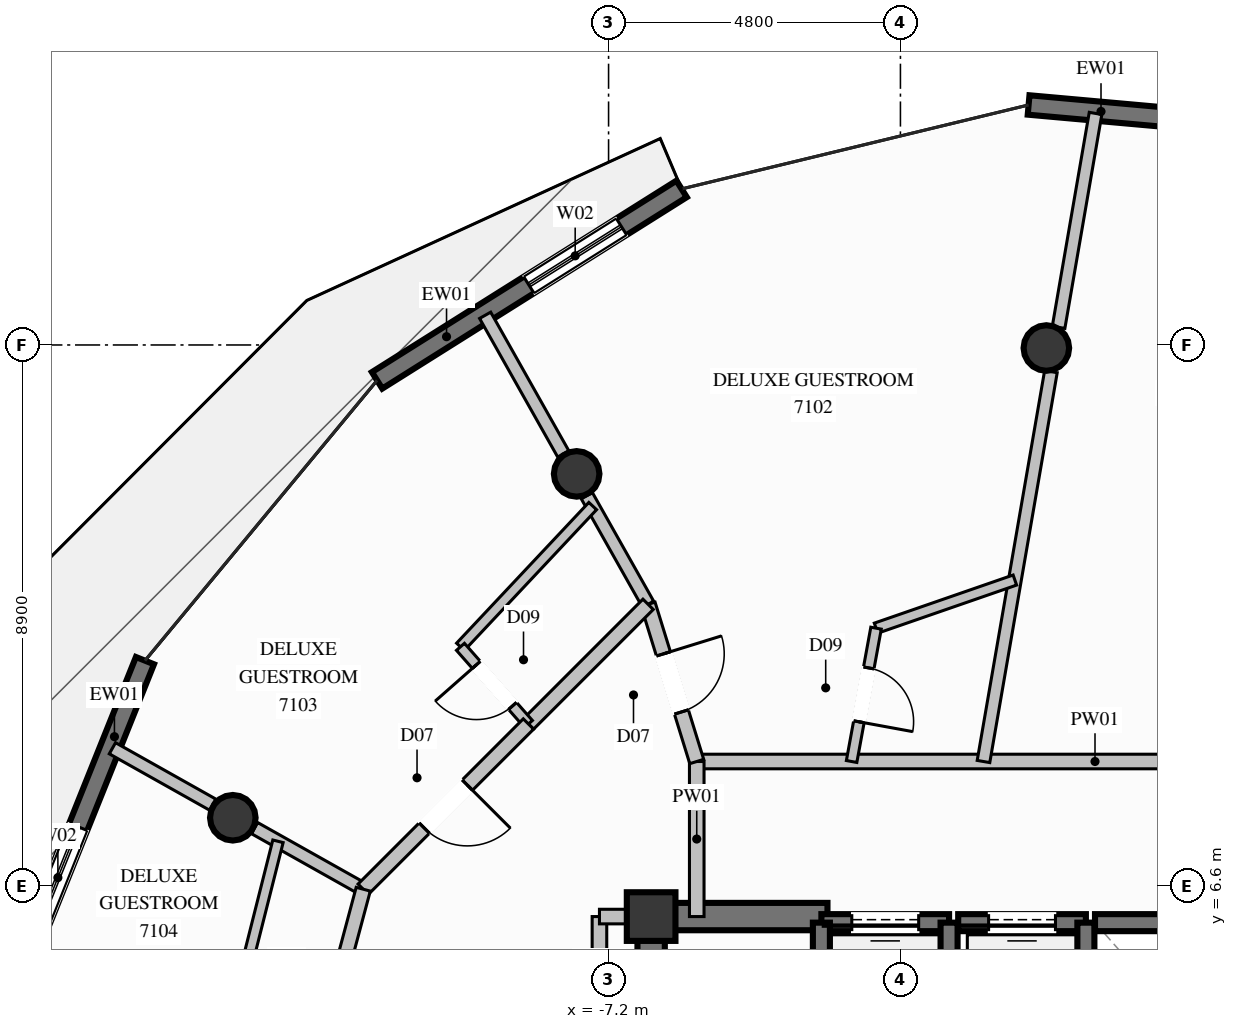
"""IFC4 building model, lengths in metres.
Left out: names, types, materials, properties, quantities, classifications, styles, units other than length and angle.
Written with IfcOpenShell. Run it as: python <this file> out.ifc"""

import sys

from ifc_helpers import new_model, si_unit, direction, frame, frame_2d, origin, origin_2d, place, context, subcontext, project, spatial, rectangle, circle, extrude, element, fill, save


model = new_model("IFC4")
c1 = context("Model", 3, precision=1e-05, world=origin(), true_north=direction((0.0, 1.0)))
c2 = subcontext(c1, "Body", "Model", "MODEL_VIEW")
j1 = project(units=[si_unit("LENGTHUNIT", "METRE"), si_unit("PLANEANGLEUNIT", "RADIAN")], contexts=[c1])
p1 = place(None, origin())
s1 = spatial("IfcSite", under=j1, at=p1, CompositionType="ELEMENT")
p2 = place(p1, origin())
s2 = spatial("IfcBuilding", under=s1, at=p2, CompositionType="ELEMENT")
p3 = place(p2, frame((0.0, 0.0, 266.8)))
s3 = spatial("IfcBuildingStorey", under=s2, at=p3, CompositionType="ELEMENT", Elevation=266.8)
p4 = place(p3, frame((-6.5, 6.1, 0.0), z_axis=(0.0, 0.0, 1.0), x_axis=(1.0, 0.0, 0.0)))
e1 = element("IfcColumn", 1, at=p4, inside=s3, PredefinedType="COLUMN", context=c2, shape_type="SweptSolid", body=[
    extrude(rectangle(XDim=0.8, YDim=0.8, at=origin_2d()), origin(), (0.0, 0.0, 1.0), 3.8),
])
p5 = place(p3, frame((-6.275, 6.1, 0.0), z_axis=(0.0, 0.0, 1.0), x_axis=(1.0, 0.0, 0.0)))
e2 = element("IfcWall", 2, at=p5, inside=s3, PredefinedType="SHEAR", context=c2, shape_type="SweptSolid", body=[
    extrude(rectangle(XDim=2.675, YDim=0.45, at=frame_2d((1.337, 0.0))), origin(), (0.0, 0.0, 1.0), 3.8),
])
p6 = place(p3, frame((-6.5, 2.35, 0.0), z_axis=(0.0, 0.0, 1.0), x_axis=(0.0, 1.0, 0.0)))
e3 = element("IfcWall", 3, at=p6, inside=s3, PredefinedType="SHEAR", context=c2, shape_type="SweptSolid", body=[
    extrude(rectangle(XDim=3.975, YDim=0.45, at=frame_2d((1.987, 0.0))), origin(), (0.0, 0.0, 1.0), 3.8),
])
for number, where, z_axis, x_axis in (
    (4, (0.0, 15.45, 0.0), (0.0, 0.0, 1.0), (1.0, 0.0, 0.0)),
    (5, (-7.725, 13.38, 0.0), (0.0, 0.0, 1.0), (1.0, 0.0, 0.0)),
    (6, (-13.38, 7.725, 0.0), (0.0, 0.0, 1.0), (1.0, 0.0, 0.0)),
):
    element("IfcColumn", number, at=place(p3, frame(where, z_axis=z_axis, x_axis=x_axis)), inside=s3, PredefinedType="COLUMN", context=c2, shape_type="SweptSolid", body=[
        extrude(circle(Radius=0.375, at=origin_2d()), origin(), (0.0, 0.0, 1.0), 3.8),
    ])
p7 = place(p3, frame((-0.292, 19.447, 0.0), z_axis=(0.0, 0.0, 1.0), x_axis=(0.996011950585, -0.08921992094, 0.0)))
e7 = element("IfcWall", 7, at=p7, inside=s3, PredefinedType="SOLIDWALL", context=c2, shape_type="SweptSolid", body=[
    extrude(rectangle(XDim=5.872, YDim=0.32, at=frame_2d((2.936, 0.0))), origin(), (0.0, 0.0, 1.0), 3.57),
])
p8 = place(p7, frame((2.641, 0.0, 0.35)))
e8 = element("IfcOpeningElement", 8, at=p8, cuts=e7, PredefinedType="OPENING", context=c2, shape_type="SweptSolid", body=[
    extrude(rectangle(XDim=1.8, YDim=2.6, at=frame_2d((0.9, 1.3))), frame((0.0, 0.17, 0.0), z_axis=(0.0, -1.0, 0.0), x_axis=(1.0, 0.0, 0.0)), (0.0, 0.0, 1.0), 0.34),
])
p9 = place(p3, frame((-11.007, 14.918, 0.0), z_axis=(0.0, 0.0, 1.0), x_axis=(0.846634423967, 0.532174926273, 0.0)))
e9 = element("IfcWall", 9, at=p9, inside=s3, PredefinedType="SOLIDWALL", context=c2, shape_type="SweptSolid", body=[
    extrude(rectangle(XDim=5.915, YDim=0.32, at=frame_2d((2.958, 0.0))), origin(), (0.0, 0.0, 1.0), 3.57),
])
p10 = place(p9, frame((2.948, 0.0, 0.35)))
e10 = element("IfcOpeningElement", 10, at=p10, cuts=e9, PredefinedType="OPENING", context=c2, shape_type="SweptSolid", body=[
    extrude(rectangle(XDim=1.8, YDim=2.6, at=frame_2d((0.9, 1.3))), frame((0.0, 0.17, 0.0), z_axis=(0.0, -1.0, 0.0), x_axis=(1.0, 0.0, 0.0)), (0.0, 0.0, 1.0), 0.34),
])
p11 = place(p3, frame((-17.079, 4.691, 0.0), z_axis=(0.0, 0.0, 1.0), x_axis=(0.372370916096, 0.928083994499, 0.0)))
e11 = element("IfcWall", 11, at=p11, inside=s3, PredefinedType="SOLIDWALL", context=c2, shape_type="SweptSolid", body=[
    extrude(rectangle(XDim=6.053, YDim=0.32, at=frame_2d((3.027, 0.0))), origin(), (0.0, 0.0, 1.0), 3.57),
])
p12 = place(p11, frame((1.308, 0.0, 0.35)))
e12 = element("IfcOpeningElement", 12, at=p12, cuts=e11, PredefinedType="OPENING", context=c2, shape_type="SweptSolid", body=[
    extrude(rectangle(XDim=1.8, YDim=2.6, at=frame_2d((0.9, 1.3))), frame((0.0, 0.17, 0.0), z_axis=(0.0, -1.0, 0.0), x_axis=(1.0, 0.0, 0.0)), (0.0, 0.0, 1.0), 0.34),
])
p13 = place(p3, frame((-1.6, 6.0, 0.0), z_axis=(0.0, 0.0, 1.0), x_axis=(-1.0, 0.0, 0.0)))
e13 = element("IfcWall", 13, at=p13, inside=s3, PredefinedType="SOLIDWALL", context=c2, shape_type="SweptSolid", body=[
    extrude(rectangle(XDim=2.1, YDim=0.28, at=frame_2d((1.05, 0.0))), origin(), (0.0, 0.0, 1.0), 3.57),
])
p14 = place(p13, frame((0.5, 0.0, 0.0)))
e14 = element("IfcOpeningElement", 14, at=p14, cuts=e13, PredefinedType="OPENING", context=c2, shape_type="SweptSolid", body=[
    extrude(rectangle(XDim=1.1, YDim=2.2, at=frame_2d((0.55, 1.1))), frame((0.0, 0.15, 0.0), z_axis=(0.0, -1.0, 0.0), x_axis=(1.0, 0.0, 0.0)), (0.0, 0.0, 1.0), 0.3),
])
for number, where, z_axis, x_axis in (
    (15, (-3.7, 6.0, 0.0), (0.0, 0.0, 1.0), (0.0, -1.0, 0.0)),
    (16, (-1.6, 3.5, 0.0), (0.0, 0.0, 1.0), (0.0, 1.0, 0.0)),
):
    element("IfcWall", number, at=place(p3, frame(where, z_axis=z_axis, x_axis=x_axis)), inside=s3, PredefinedType="SOLIDWALL", context=c2, shape_type="SweptSolid", body=[
        extrude(rectangle(XDim=2.5, YDim=0.28, at=frame_2d((1.25, 0.0))), origin(), (0.0, 0.0, 1.0), 3.57),
    ])
p15 = place(p3, frame((0.65, 6.0, 0.0), z_axis=(0.0, 0.0, 1.0), x_axis=(-1.0, 0.0, 0.0)))
e17 = element("IfcWall", 17, at=p15, inside=s3, PredefinedType="SOLIDWALL", context=c2, shape_type="SweptSolid", body=[
    extrude(rectangle(XDim=2.1, YDim=0.28, at=frame_2d((1.05, 0.0))), origin(), (0.0, 0.0, 1.0), 3.57),
])
p16 = place(p15, frame((0.5, 0.0, 0.0)))
e18 = element("IfcOpeningElement", 18, at=p16, cuts=e17, PredefinedType="OPENING", context=c2, shape_type="SweptSolid", body=[
    extrude(rectangle(XDim=1.1, YDim=2.2, at=frame_2d((0.55, 1.1))), frame((0.0, 0.15, 0.0), z_axis=(0.0, -1.0, 0.0), x_axis=(1.0, 0.0, 0.0)), (0.0, 0.0, 1.0), 0.3),
])
p17 = place(p3, frame((0.65, 3.5, 0.0), z_axis=(0.0, 0.0, 1.0), x_axis=(0.0, 1.0, 0.0)))
e19 = element("IfcWall", 19, at=p17, inside=s3, PredefinedType="SOLIDWALL", context=c2, shape_type="SweptSolid", body=[
    extrude(rectangle(XDim=2.5, YDim=0.28, at=frame_2d((1.25, 0.0))), origin(), (0.0, 0.0, 1.0), 3.57),
])
p18 = place(p3, frame((3.0, 6.0, 0.0), z_axis=(0.0, 0.0, 1.0), x_axis=(-1.0, 0.0, 0.0)))
e20 = element("IfcWall", 20, at=p18, inside=s3, PredefinedType="SOLIDWALL", context=c2, shape_type="SweptSolid", body=[
    extrude(rectangle(XDim=2.2, YDim=0.28, at=frame_2d((1.1, 0.0))), origin(), (0.0, 0.0, 1.0), 3.57),
])
p19 = place(p3, frame((-5.75, 8.65, 0.0), z_axis=(0.0, 0.0, 1.0), x_axis=(1.0, 0.0, 0.0)))
e21 = element("IfcWall", 21, at=p19, inside=s3, PredefinedType="PARTITIONING", context=c2, shape_type="SweptSolid", body=[
    extrude(rectangle(XDim=13.1, YDim=0.24, at=frame_2d((6.55, 0.0))), origin(), (0.0, 0.0, 1.0), 3.57),
])
p20 = place(p3, frame((-5.75, 6.1, 0.0), z_axis=(0.0, 0.0, 1.0), x_axis=(0.0, 1.0, 0.0)))
e22 = element("IfcWall", 22, at=p20, inside=s3, PredefinedType="PARTITIONING", context=c2, shape_type="SweptSolid", body=[
    extrude(rectangle(XDim=2.55, YDim=0.24, at=frame_2d((1.275, 0.0))), origin(), (0.0, 0.0, 1.0), 3.57),
])
p21 = place(p3, frame((-7.35, 4.95, 0.0), z_axis=(0.0, 0.0, 1.0), x_axis=(0.0, 1.0, 0.0)))
e23 = element("IfcWall", 23, at=p21, inside=s3, PredefinedType="PARTITIONING", context=c2, shape_type="SweptSolid", body=[
    extrude(rectangle(XDim=1.15, YDim=0.24, at=frame_2d((0.575, 0.0))), origin(), (0.0, 0.0, 1.0), 2.655),
])
p22 = place(p3, frame((-7.35, 6.1, 0.0), z_axis=(0.0, 0.0, 1.0), x_axis=(1.0, 0.0, 0.0)))
e24 = element("IfcWall", 24, at=p22, inside=s3, PredefinedType="PARTITIONING", context=c2, shape_type="SweptSolid", body=[
    extrude(rectangle(XDim=0.85, YDim=0.24, at=frame_2d((0.425, 0.0))), origin(), (0.0, 0.0, 1.0), 3.085),
])
p23 = place(p3, frame((-6.55, 11.235, 0.0), z_axis=(0.0, 0.0, 1.0), x_axis=(-0.491351277928, 0.87096149265, 0.0)))
e25 = element("IfcWall", 25, at=p23, inside=s3, PredefinedType="PARTITIONING", context=c2, shape_type="SweptSolid", body=[
    extrude(rectangle(XDim=2.052, YDim=0.21, at=frame_2d((1.026, 0.0))), origin(), (0.0, 0.0, 1.0), 3.085),
])
p24 = place(p3, frame((-7.945, 13.708, 0.0), z_axis=(0.0, 0.0, 1.0), x_axis=(-0.490956426974, 0.87118412911, 0.0)))
e26 = element("IfcWall", 26, at=p24, inside=s3, PredefinedType="PARTITIONING", context=c2, shape_type="SweptSolid", body=[
    extrude(rectangle(XDim=2.617, YDim=0.21, at=frame_2d((1.309, 0.0))), origin(), (0.0, 0.0, 1.0), 3.57),
])
p25 = place(p3, frame((-11.235, 6.55, 0.0), z_axis=(0.0, 0.0, 1.0), x_axis=(-0.871737625494, 0.489972970987, 0.0)))
e27 = element("IfcWall", 27, at=p25, inside=s3, PredefinedType="PARTITIONING", context=c2, shape_type="SweptSolid", body=[
    extrude(rectangle(XDim=2.051, YDim=0.21, at=frame_2d((1.025, 0.0))), origin(), (0.0, 0.0, 1.0), 3.085),
])
p26 = place(p3, frame((-13.711, 7.941, 0.0), z_axis=(0.0, 0.0, 1.0), x_axis=(-0.87172369265, 0.489997758844, 0.0)))
e28 = element("IfcWall", 28, at=p26, inside=s3, PredefinedType="PARTITIONING", context=c2, shape_type="SweptSolid", body=[
    extrude(rectangle(XDim=1.892, YDim=0.21, at=frame_2d((0.946, 0.0))), origin(), (0.0, 0.0, 1.0), 3.57),
])
p27 = place(p3, frame((-1.034, 8.65, 0.0), z_axis=(0.0, 0.0, 1.0), x_axis=(0.170406932978, 0.985373775373, 0.0)))
e29 = element("IfcWall", 29, at=p27, inside=s3, PredefinedType="PARTITIONING", context=c2, shape_type="SweptSolid", body=[
    extrude(rectangle(XDim=6.507, YDim=0.21, at=frame_2d((3.254, 0.0))), origin(), (0.0, 0.0, 1.0), 3.57),
])
p28 = place(p3, frame((0.201, 15.79, 0.0), z_axis=(0.0, 0.0, 1.0), x_axis=(0.170339696933, 0.985385400566, 0.0)))
e30 = element("IfcWall", 30, at=p28, inside=s3, PredefinedType="PARTITIONING", context=c2, shape_type="SweptSolid", body=[
    extrude(rectangle(XDim=3.57, YDim=0.21, at=frame_2d((1.785, 0.0))), origin(), (0.0, 0.0, 1.0), 3.57),
])
p29 = place(p3, frame((-2.801, 10.843, 0.0), z_axis=(0.0, 0.0, 1.0), x_axis=(0.944888722347, 0.327391665106, 0.0)))
e31 = element("IfcWall", 31, at=p29, inside=s3, PredefinedType="PLUMBINGWALL", context=c2, shape_type="SweptSolid", body=[
    extrude(rectangle(XDim=2.416, YDim=0.175, at=frame_2d((1.208, 0.0))), origin(), (0.0, 0.0, 1.0), 3.57),
])
p30 = place(p3, frame((-2.801, 10.843, 0.0), z_axis=(0.0, 0.0, 1.0), x_axis=(-0.180234289761, -0.983623708943, 0.0)))
e32 = element("IfcWall", 32, at=p30, inside=s3, PredefinedType="PLUMBINGWALL", context=c2, shape_type="SweptSolid", body=[
    extrude(rectangle(XDim=2.23, YDim=0.175, at=frame_2d((1.115, 0.0))), origin(), (0.0, 0.0, 1.0), 3.57),
])
p31 = place(p30, frame((0.665, 0.0, 0.0)))
e33 = element("IfcOpeningElement", 33, at=p31, cuts=e32, PredefinedType="OPENING", context=c2, shape_type="SweptSolid", body=[
    extrude(rectangle(XDim=0.9, YDim=2.1, at=frame_2d((0.45, 1.05))), frame((0.0, 0.098, 0.0), z_axis=(0.0, -1.0, 0.0), x_axis=(1.0, 0.0, 0.0)), (0.0, 0.0, 1.0), 0.195),
])
p32 = place(p3, frame((-6.55, 11.235, 0.0), z_axis=(0.0, 0.0, 1.0), x_axis=(0.295638642954, -0.955299844443, 0.0)))
e34 = element("IfcWall", 34, at=p32, inside=s3, PredefinedType="PARTITIONING", context=c2, shape_type="SweptSolid", body=[
    extrude(rectangle(XDim=2.706, YDim=0.24, at=frame_2d((1.353, 0.0))), origin(), (0.0, 0.0, 1.0), 3.57),
])
p33 = place(p32, frame((0.853, 0.0, 0.0)))
e35 = element("IfcOpeningElement", 35, at=p33, cuts=e34, PredefinedType="OPENING", context=c2, shape_type="SweptSolid", body=[
    extrude(rectangle(XDim=1.0, YDim=2.2, at=frame_2d((0.5, 1.1))), frame((0.0, 0.13, 0.0), z_axis=(0.0, -1.0, 0.0), x_axis=(1.0, 0.0, 0.0)), (0.0, 0.0, 1.0), 0.26),
])
p34 = place(p3, frame((-6.55, 11.235, 0.0), z_axis=(0.0, 0.0, 1.0), x_axis=(-0.707106781187, -0.707106781187, 0.0)))
e36 = element("IfcWall", 36, at=p34, inside=s3, PredefinedType="PARTITIONING", context=c2, shape_type="SweptSolid", body=[
    extrude(rectangle(XDim=2.783, YDim=0.24, at=frame_2d((1.392, 0.0))), origin(), (0.0, 0.0, 1.0), 3.57),
])
p35 = place(p3, frame((-7.461, 12.851, 0.0), z_axis=(0.0, 0.0, 1.0), x_axis=(-0.684705153541, -0.728820178586, 0.0)))
e37 = element("IfcWall", 37, at=p35, inside=s3, PredefinedType="PLUMBINGWALL", context=c2, shape_type="SweptSolid", body=[
    extrude(rectangle(XDim=3.177, YDim=0.175, at=frame_2d((1.588, 0.0))), origin(), (0.0, 0.0, 1.0), 3.137),
])
p36 = place(p3, frame((-8.518, 9.267, 0.0), z_axis=(0.0, 0.0, 1.0), x_axis=(-0.661086668584, 0.750309547201, 0.0)))
e38 = element("IfcWall", 38, at=p36, inside=s3, PredefinedType="PLUMBINGWALL", context=c2, shape_type="SweptSolid", body=[
    extrude(rectangle(XDim=1.691, YDim=0.175, at=frame_2d((0.845, 0.0))), origin(), (0.0, 0.0, 1.0), 3.57),
])
p37 = place(p36, frame((0.396, 0.0, 0.0)))
e39 = element("IfcOpeningElement", 39, at=p37, cuts=e38, PredefinedType="OPENING", context=c2, shape_type="SweptSolid", body=[
    extrude(rectangle(XDim=0.9, YDim=2.1, at=frame_2d((0.45, 1.05))), frame((0.0, 0.098, 0.0), z_axis=(0.0, -1.0, 0.0), x_axis=(1.0, 0.0, 0.0)), (0.0, 0.0, 1.0), 0.195),
])
p38 = place(p3, frame((-8.518, 9.267, 0.0), z_axis=(0.0, 0.0, 1.0), x_axis=(-0.707106781187, -0.707106781187, 0.0)))
e40 = element("IfcWall", 40, at=p38, inside=s3, PredefinedType="PARTITIONING", context=c2, shape_type="SweptSolid", body=[
    extrude(rectangle(XDim=3.843, YDim=0.24, at=frame_2d((1.921, 0.0))), origin(), (0.0, 0.0, 1.0), 3.57),
])
p39 = place(p38, frame((1.421, 0.0, 0.0)))
e41 = element("IfcOpeningElement", 41, at=p39, cuts=e40, PredefinedType="OPENING", context=c2, shape_type="SweptSolid", body=[
    extrude(rectangle(XDim=1.0, YDim=2.2, at=frame_2d((0.5, 1.1))), frame((0.0, 0.13, 0.0), z_axis=(0.0, -1.0, 0.0), x_axis=(1.0, 0.0, 0.0)), (0.0, 0.0, 1.0), 0.26),
])
p40 = place(p3, frame((-11.235, 6.55, 0.0), z_axis=(0.0, 0.0, 1.0), x_axis=(-0.258727314432, -0.96595040078, 0.0)))
e42 = element("IfcWall", 42, at=p40, inside=s3, PredefinedType="PARTITIONING", context=c2, shape_type="SweptSolid", body=[
    extrude(rectangle(XDim=2.783, YDim=0.24, at=frame_2d((1.391, 0.0))), origin(), (0.0, 0.0, 1.0), 3.57),
])
p41 = place(p3, frame((-12.637, 7.338, 0.0), z_axis=(0.0, 0.0, 1.0), x_axis=(-0.244678847227, -0.969604177858, 0.0)))
e43 = element("IfcWall", 43, at=p41, inside=s3, PredefinedType="PLUMBINGWALL", context=c2, shape_type="SweptSolid", body=[
    extrude(rectangle(XDim=3.135, YDim=0.175, at=frame_2d((1.567, 0.0))), origin(), (0.0, 0.0, 1.0), 3.57),
])
p42 = place(p10, origin())
e44 = element("IfcWindow", 44, at=p42, inside=s3, PartitioningType="SINGLE_PANEL", PredefinedType="WINDOW", context=c2, shape_type="SweptSolid", body=[
    extrude(rectangle(XDim=1.8, YDim=2.6, at=frame_2d((0.9, 1.3))), frame((0.0, 0.03, 0.0), z_axis=(0.0, -1.0, 0.0), x_axis=(1.0, 0.0, 0.0)), (0.0, 0.0, 1.0), 0.06),
])
fill(e10, e44)
p43 = place(p12, origin())
e45 = element("IfcWindow", 45, at=p43, inside=s3, PartitioningType="SINGLE_PANEL", PredefinedType="WINDOW", context=c2, shape_type="SweptSolid", body=[
    extrude(rectangle(XDim=1.8, YDim=2.6, at=frame_2d((0.9, 1.3))), frame((0.0, 0.03, 0.0), z_axis=(0.0, -1.0, 0.0), x_axis=(1.0, 0.0, 0.0)), (0.0, 0.0, 1.0), 0.06),
])
fill(e12, e45)
p44 = place(p14, origin())
e46 = element("IfcDoor", 46, at=p44, inside=s3, OperationType="SLIDING_TO_LEFT", PredefinedType="DOOR", context=c2, shape_type="SweptSolid", body=[
    extrude(rectangle(XDim=1.1, YDim=2.2, at=frame_2d((0.55, 1.1))), frame((0.0, 0.025, 0.0), z_axis=(0.0, -1.0, 0.0), x_axis=(1.0, 0.0, 0.0)), (0.0, 0.0, 1.0), 0.05),
])
fill(e14, e46)
p45 = place(p16, origin())
e47 = element("IfcDoor", 47, at=p45, inside=s3, OperationType="SLIDING_TO_LEFT", PredefinedType="DOOR", context=c2, shape_type="SweptSolid", body=[
    extrude(rectangle(XDim=1.1, YDim=2.2, at=frame_2d((0.55, 1.1))), frame((0.0, 0.025, 0.0), z_axis=(0.0, -1.0, 0.0), x_axis=(1.0, 0.0, 0.0)), (0.0, 0.0, 1.0), 0.05),
])
fill(e18, e47)
p46 = place(p31, origin())
e48 = element("IfcDoor", 48, at=p46, inside=s3, OperationType="SINGLE_SWING_RIGHT", PredefinedType="DOOR", context=c2, shape_type="SweptSolid", body=[
    extrude(rectangle(XDim=0.9, YDim=2.1, at=frame_2d((0.45, 1.05))), frame((0.0, 0.025, 0.0), z_axis=(0.0, -1.0, 0.0), x_axis=(1.0, 0.0, 0.0)), (0.0, 0.0, 1.0), 0.05),
])
fill(e33, e48)
p47 = place(p33, origin())
e49 = element("IfcDoor", 49, at=p47, inside=s3, OperationType="SINGLE_SWING_LEFT", PredefinedType="DOOR", context=c2, shape_type="SweptSolid", body=[
    extrude(rectangle(XDim=1.0, YDim=2.2, at=frame_2d((0.5, 1.1))), frame((0.0, 0.025, 0.0), z_axis=(0.0, -1.0, 0.0), x_axis=(1.0, 0.0, 0.0)), (0.0, 0.0, 1.0), 0.05),
])
fill(e35, e49)
p48 = place(p37, origin())
e50 = element("IfcDoor", 50, at=p48, inside=s3, OperationType="SINGLE_SWING_RIGHT", PredefinedType="DOOR", context=c2, shape_type="SweptSolid", body=[
    extrude(rectangle(XDim=0.9, YDim=2.1, at=frame_2d((0.45, 1.05))), frame((0.0, 0.025, 0.0), z_axis=(0.0, -1.0, 0.0), x_axis=(1.0, 0.0, 0.0)), (0.0, 0.0, 1.0), 0.05),
])
fill(e39, e50)
p49 = place(p39, origin())
e51 = element("IfcDoor", 51, at=p49, inside=s3, OperationType="SINGLE_SWING_LEFT", PredefinedType="DOOR", context=c2, shape_type="SweptSolid", body=[
    extrude(rectangle(XDim=1.0, YDim=2.2, at=frame_2d((0.5, 1.1))), frame((0.0, 0.025, 0.0), z_axis=(0.0, -1.0, 0.0), x_axis=(1.0, 0.0, 0.0)), (0.0, 0.0, 1.0), 0.05),
])
fill(e41, e51)
save(model, sys.argv[1])
